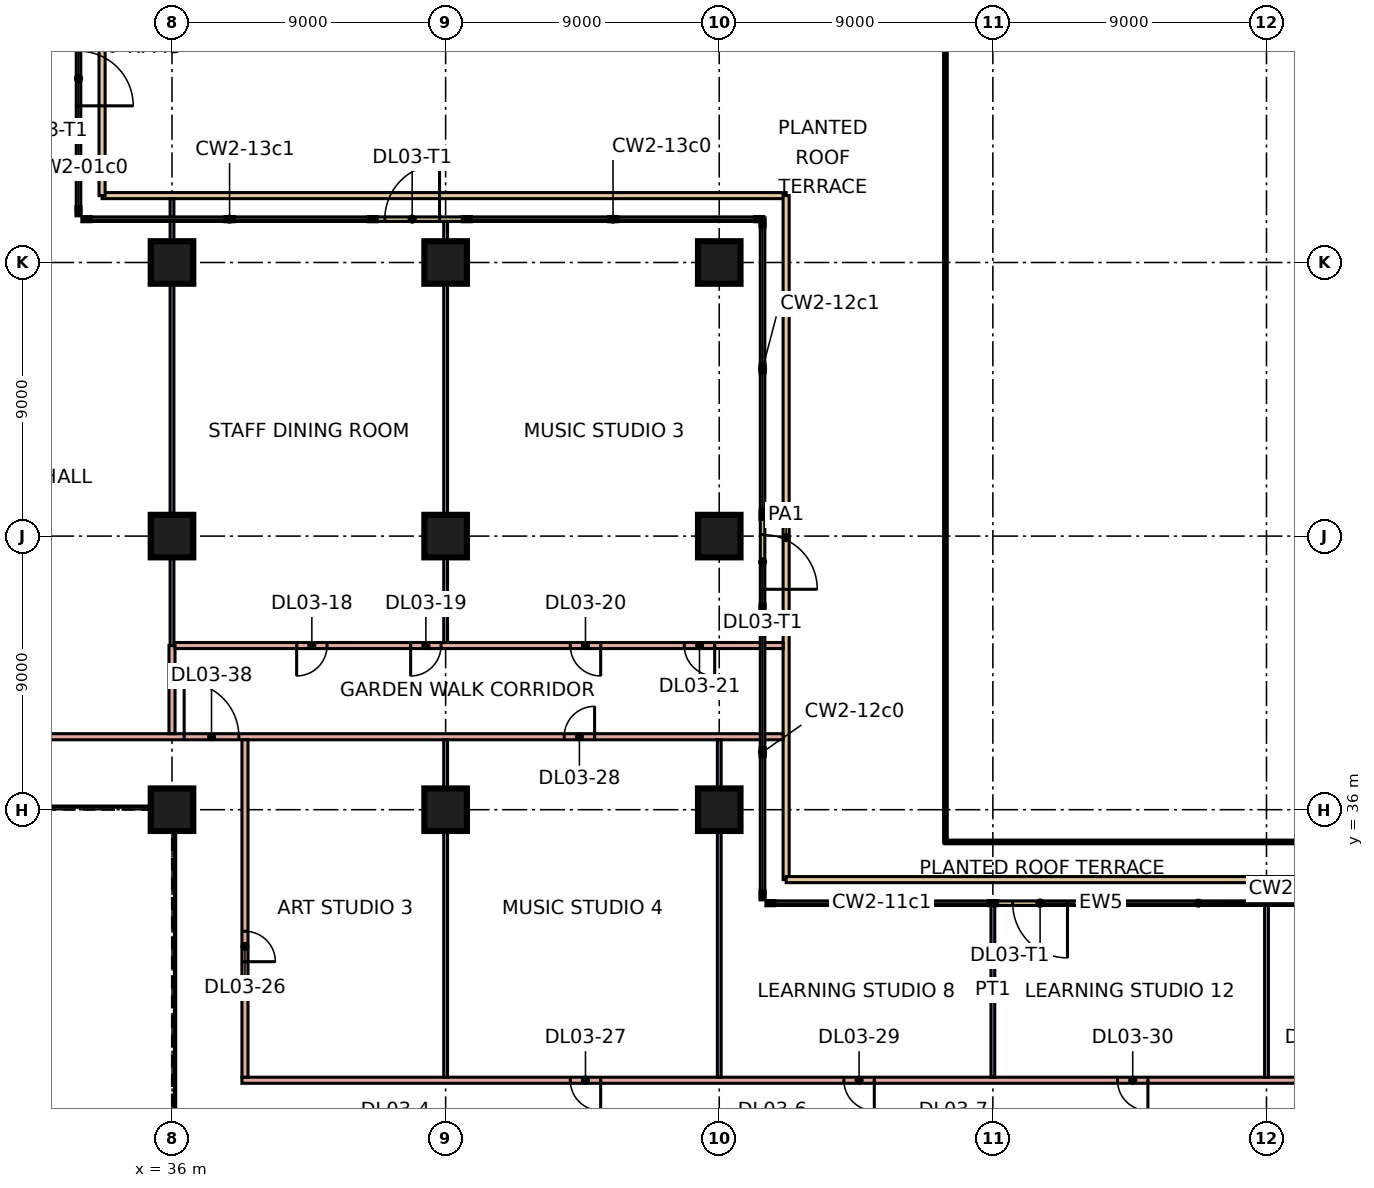
"""IFC4 building model, lengths in metres.
Left out: names, types, materials, properties, quantities, classifications, styles, units other than length and angle.
Written with IfcOpenShell. Run it as: python <this file> out.ifc"""

import sys

from ifc_helpers import new_model, si_unit, direction, frame, frame_2d, origin, origin_2d, place, context, subcontext, project, spatial, rectangle, extrude, element, fill, save


model = new_model("IFC4")
c1 = context("Model", 3, precision=1e-05, world=origin(), true_north=direction((0.0, 1.0)))
c2 = subcontext(c1, "Body", "Model", "MODEL_VIEW")
j1 = project(units=[si_unit("LENGTHUNIT", "METRE"), si_unit("PLANEANGLEUNIT", "RADIAN")], contexts=[c1])
p1 = place(None, origin())
s1 = spatial("IfcSite", under=j1, at=p1, CompositionType="ELEMENT")
p2 = place(p1, origin())
s2 = spatial("IfcBuilding", under=s1, at=p2, CompositionType="ELEMENT")
p3 = place(p2, frame((0.0, 0.0, 16.8)))
s3 = spatial("IfcBuildingStorey", under=s2, at=p3, CompositionType="ELEMENT", Elevation=16.8)
for number, where, z_axis, x_axis in (
    (1, (36.0, 36.0, 0.0), (0.0, 0.0, 1.0), (1.0, 0.0, 0.0)),
    (2, (45.0, 36.0, 0.0), (0.0, 0.0, 1.0), (1.0, 0.0, 0.0)),
    (3, (54.0, 36.0, 0.0), (0.0, 0.0, 1.0), (1.0, 0.0, 0.0)),
    (4, (36.0, 45.0, 0.0), (0.0, 0.0, 1.0), (1.0, 0.0, 0.0)),
    (5, (45.0, 45.0, 0.0), (0.0, 0.0, 1.0), (1.0, 0.0, 0.0)),
    (6, (54.0, 45.0, 0.0), (0.0, 0.0, 1.0), (1.0, 0.0, 0.0)),
    (7, (36.0, 54.0, 0.0), (0.0, 0.0, 1.0), (1.0, 0.0, 0.0)),
    (8, (45.0, 54.0, 0.0), (0.0, 0.0, 1.0), (1.0, 0.0, 0.0)),
    (9, (54.0, 54.0, 0.0), (0.0, 0.0, 1.0), (1.0, 0.0, 0.0)),
):
    element("IfcColumn", number, at=place(p3, frame(where, z_axis=z_axis, x_axis=x_axis)), inside=s3, PredefinedType="COLUMN", context=c2, shape_type="SweptSolid", body=[
        extrude(rectangle(XDim=1.4, YDim=1.4, at=origin_2d()), origin(), (0.0, 0.0, 1.0), 4.8),
    ])
p4 = place(p3, frame((32.925, 58.553, 0.0), z_axis=(0.0, 0.0, 1.0), x_axis=(0.0, 1.0, 0.0)))
e10 = element("IfcWall", 10, at=p4, inside=s3, PredefinedType="SOLIDWALL", context=c2, shape_type="SweptSolid", body=[
    extrude(rectangle(XDim=3.0, YDim=0.15, at=frame_2d((1.5, 0.0))), origin(), (0.0, 0.0, 1.0), 4.4),
])
p5 = place(p4, frame((0.6, 0.0, 0.0)))
e11 = element("IfcOpeningElement", 11, at=p5, cuts=e10, PredefinedType="OPENING", context=c2, shape_type="SweptSolid", body=[
    extrude(rectangle(XDim=1.8, YDim=2.4, at=frame_2d((0.9, 1.2))), frame((0.0, 0.085, 0.0), z_axis=(0.0, -1.0, 0.0), x_axis=(1.0, 0.0, 0.0)), (0.0, 0.0, 1.0), 0.17),
])
p6 = place(p3, frame((66.053, 32.925, 0.0), z_axis=(0.0, 0.0, 1.0), x_axis=(-1.0, 0.0, 0.0)))
e12 = element("IfcWall", 12, at=p6, inside=s3, PredefinedType="SOLIDWALL", context=c2, shape_type="SweptSolid", body=[
    extrude(rectangle(XDim=3.0, YDim=0.15, at=frame_2d((1.5, 0.0))), origin(), (0.0, 0.0, 1.0), 4.4),
])
p7 = place(p6, frame((0.6, 0.0, 0.0)))
e13 = element("IfcOpeningElement", 13, at=p7, cuts=e12, PredefinedType="OPENING", context=c2, shape_type="SweptSolid", body=[
    extrude(rectangle(XDim=1.8, YDim=2.4, at=frame_2d((0.9, 1.2))), frame((0.0, 0.085, 0.0), z_axis=(0.0, -1.0, 0.0), x_axis=(1.0, 0.0, 0.0)), (0.0, 0.0, 1.0), 0.17),
])
p8 = place(p3, frame((55.425, 42.65, 0.0), z_axis=(0.0, 0.0, 1.0), x_axis=(0.0, 1.0, 0.0)))
e14 = element("IfcWall", 14, at=p8, inside=s3, PredefinedType="SOLIDWALL", context=c2, shape_type="SweptSolid", body=[
    extrude(rectangle(XDim=3.0, YDim=0.15, at=frame_2d((1.5, 0.0))), origin(), (0.0, 0.0, 1.0), 4.4),
])
p9 = place(p8, frame((0.6, 0.0, 0.0)))
e15 = element("IfcOpeningElement", 15, at=p9, cuts=e14, PredefinedType="OPENING", context=c2, shape_type="SweptSolid", body=[
    extrude(rectangle(XDim=1.8, YDim=2.4, at=frame_2d((0.9, 1.2))), frame((0.0, 0.085, 0.0), z_axis=(0.0, -1.0, 0.0), x_axis=(1.0, 0.0, 0.0)), (0.0, 0.0, 1.0), 0.17),
])
p10 = place(p3, frame((45.65, 55.425, 0.0), z_axis=(0.0, 0.0, 1.0), x_axis=(-1.0, 0.0, 0.0)))
e16 = element("IfcWall", 16, at=p10, inside=s3, PredefinedType="SOLIDWALL", context=c2, shape_type="SweptSolid", body=[
    extrude(rectangle(XDim=3.0, YDim=0.15, at=frame_2d((1.5, 0.0))), origin(), (0.0, 0.0, 1.0), 4.4),
])
p11 = place(p10, frame((0.85, 0.0, 0.0)))
e17 = element("IfcOpeningElement", 17, at=p11, cuts=e16, PredefinedType="OPENING", context=c2, shape_type="SweptSolid", body=[
    extrude(rectangle(XDim=1.8, YDim=2.4, at=frame_2d((0.9, 1.2))), frame((0.0, 0.085, 0.0), z_axis=(0.0, -1.0, 0.0), x_axis=(1.0, 0.0, 0.0)), (0.0, 0.0, 1.0), 0.17),
])
for number, where, z_axis, x_axis in (
    (18, (33.7, 56.2, 0.0), (0.0, 0.0, 1.0), (1.0, 0.0, 0.0)),
    (19, (56.2, 56.2, 0.0), (0.0, 0.0, 1.0), (0.0, -1.0, 0.0)),
):
    element("IfcWall", number, at=place(p3, frame(where, z_axis=z_axis, x_axis=x_axis)), inside=s3, PredefinedType="PARAPET", context=c2, shape_type="SweptSolid", body=[
        extrude(rectangle(XDim=22.5, YDim=0.2, at=frame_2d((11.25, 0.0))), origin(), (0.0, 0.0, 1.0), 0.5),
    ])
p12 = place(p3, frame((56.2, 33.7, 0.0), z_axis=(0.0, 0.0, 1.0), x_axis=(1.0, 0.0, 0.0)))
e20 = element("IfcWall", 20, at=p12, inside=s3, PredefinedType="PARAPET", context=c2, shape_type="SweptSolid", body=[
    extrude(rectangle(XDim=17.697, YDim=0.2, at=frame_2d((8.848, 0.0))), origin(), (0.0, 0.0, 1.0), 0.5),
])
p13 = place(p3, frame((33.7, 64.896, 0.0), z_axis=(0.0, 0.0, 1.0), x_axis=(0.0, -1.0, 0.0)))
e21 = element("IfcWall", 21, at=p13, inside=s3, PredefinedType="PARAPET", context=c2, shape_type="SweptSolid", body=[
    extrude(rectangle(XDim=8.697, YDim=0.2, at=frame_2d((4.348, 0.0))), origin(), (0.0, 0.0, 1.0), 0.5),
])
p14 = place(p3, frame((27.0, 38.4, 0.0), z_axis=(0.0, 0.0, 1.0), x_axis=(1.0, 0.0, 0.0)))
e22 = element("IfcWall", 22, at=p14, inside=s3, PredefinedType="PARTITIONING", context=c2, shape_type="SweptSolid", body=[
    extrude(rectangle(XDim=29.1, YDim=0.2, at=frame_2d((14.55, 0.0))), origin(), (0.0, 0.0, 1.0), 4.4),
])
p15 = place(p14, frame((21.9, 0.0, 0.0)))
e23 = element("IfcOpeningElement", 23, at=p15, cuts=e22, PredefinedType="OPENING", context=c2, shape_type="SweptSolid", body=[
    extrude(rectangle(XDim=1.0, YDim=2.1, at=frame_2d((0.5, 1.05))), frame((0.0, 0.11, 0.0), z_axis=(0.0, -1.0, 0.0), x_axis=(1.0, 0.0, 0.0)), (0.0, 0.0, 1.0), 0.22),
])
p16 = place(p14, frame((9.4, 0.0, 0.0)))
e24 = element("IfcOpeningElement", 24, at=p16, cuts=e22, PredefinedType="OPENING", context=c2, shape_type="SweptSolid", body=[
    extrude(rectangle(XDim=1.8, YDim=2.1, at=frame_2d((0.9, 1.05))), frame((0.0, 0.11, 0.0), z_axis=(0.0, -1.0, 0.0), x_axis=(1.0, 0.0, 0.0)), (0.0, 0.0, 1.0), 0.22),
])
p17 = place(p3, frame((36.0, 38.5, 0.0), z_axis=(0.0, 0.0, 1.0), x_axis=(0.0, 1.0, 0.0)))
e25 = element("IfcWall", 25, at=p17, inside=s3, PredefinedType="PARTITIONING", context=c2, shape_type="SweptSolid", body=[
    extrude(rectangle(XDim=2.9, YDim=0.2, at=frame_2d((1.45, 0.0))), origin(), (0.0, 0.0, 1.0), 4.4),
])
p18 = place(p3, frame((36.0, 41.4, 0.0), z_axis=(0.0, 0.0, 1.0), x_axis=(0.0, 1.0, 0.0)))
e26 = element("IfcWall", 26, at=p18, inside=s3, PredefinedType="PARTITIONING", context=c2, shape_type="SweptSolid", body=[
    extrude(rectangle(XDim=14.7, YDim=0.125, at=frame_2d((7.35, 0.0))), origin(), (0.0, 0.0, 1.0), 4.4),
])
p19 = place(p3, frame((36.1, 41.4, 0.0), z_axis=(0.0, 0.0, 1.0), x_axis=(1.0, 0.0, 0.0)))
e27 = element("IfcWall", 27, at=p19, inside=s3, PredefinedType="PARTITIONING", context=c2, shape_type="SweptSolid", body=[
    extrude(rectangle(XDim=20.0, YDim=0.2, at=frame_2d((10.0, 0.0))), origin(), (0.0, 0.0, 1.0), 4.4),
])
p20 = place(p19, frame((4.0, 0.0, 0.0)))
e28 = element("IfcOpeningElement", 28, at=p20, cuts=e27, PredefinedType="OPENING", context=c2, shape_type="SweptSolid", body=[
    extrude(rectangle(XDim=1.0, YDim=2.1, at=frame_2d((0.5, 1.05))), frame((0.0, 0.11, 0.0), z_axis=(0.0, -1.0, 0.0), x_axis=(1.0, 0.0, 0.0)), (0.0, 0.0, 1.0), 0.22),
])
p21 = place(p19, frame((7.75, 0.0, 0.0)))
e29 = element("IfcOpeningElement", 29, at=p21, cuts=e27, PredefinedType="OPENING", context=c2, shape_type="SweptSolid", body=[
    extrude(rectangle(XDim=1.0, YDim=2.1, at=frame_2d((0.5, 1.05))), frame((0.0, 0.11, 0.0), z_axis=(0.0, -1.0, 0.0), x_axis=(1.0, 0.0, 0.0)), (0.0, 0.0, 1.0), 0.22),
])
p22 = place(p19, frame((13.0, 0.0, 0.0)))
e30 = element("IfcOpeningElement", 30, at=p22, cuts=e27, PredefinedType="OPENING", context=c2, shape_type="SweptSolid", body=[
    extrude(rectangle(XDim=1.0, YDim=2.1, at=frame_2d((0.5, 1.05))), frame((0.0, 0.11, 0.0), z_axis=(0.0, -1.0, 0.0), x_axis=(1.0, 0.0, 0.0)), (0.0, 0.0, 1.0), 0.22),
])
p23 = place(p19, frame((16.75, 0.0, 0.0)))
e31 = element("IfcOpeningElement", 31, at=p23, cuts=e27, PredefinedType="OPENING", context=c2, shape_type="SweptSolid", body=[
    extrude(rectangle(XDim=1.0, YDim=2.1, at=frame_2d((0.5, 1.05))), frame((0.0, 0.11, 0.0), z_axis=(0.0, -1.0, 0.0), x_axis=(1.0, 0.0, 0.0)), (0.0, 0.0, 1.0), 0.22),
])
p24 = place(p3, frame((38.3, 27.1, 0.0), z_axis=(0.0, 0.0, 1.0), x_axis=(1.0, 0.0, 0.0)))
e32 = element("IfcWall", 32, at=p24, inside=s3, PredefinedType="PARTITIONING", context=c2, shape_type="SweptSolid", body=[
    extrude(rectangle(XDim=36.8, YDim=0.2, at=frame_2d((18.4, 0.0))), origin(), (0.0, 0.0, 1.0), 4.4),
])
p25 = place(p24, frame((10.8, 0.0, 0.0)))
e33 = element("IfcOpeningElement", 33, at=p25, cuts=e32, PredefinedType="OPENING", context=c2, shape_type="SweptSolid", body=[
    extrude(rectangle(XDim=1.0, YDim=2.1, at=frame_2d((0.5, 1.05))), frame((0.0, 0.11, 0.0), z_axis=(0.0, -1.0, 0.0), x_axis=(1.0, 0.0, 0.0)), (0.0, 0.0, 1.0), 0.22),
])
p26 = place(p24, frame((19.8, 0.0, 0.0)))
e34 = element("IfcOpeningElement", 34, at=p26, cuts=e32, PredefinedType="OPENING", context=c2, shape_type="SweptSolid", body=[
    extrude(rectangle(XDim=1.0, YDim=2.1, at=frame_2d((0.5, 1.05))), frame((0.0, 0.11, 0.0), z_axis=(0.0, -1.0, 0.0), x_axis=(1.0, 0.0, 0.0)), (0.0, 0.0, 1.0), 0.22),
])
p27 = place(p24, frame((28.8, 0.0, 0.0)))
e35 = element("IfcOpeningElement", 35, at=p27, cuts=e32, PredefinedType="OPENING", context=c2, shape_type="SweptSolid", body=[
    extrude(rectangle(XDim=1.0, YDim=2.1, at=frame_2d((0.5, 1.05))), frame((0.0, 0.11, 0.0), z_axis=(0.0, -1.0, 0.0), x_axis=(1.0, 0.0, 0.0)), (0.0, 0.0, 1.0), 0.22),
])
p28 = place(p24, frame((35.15, 0.0, 0.0)))
e36 = element("IfcOpeningElement", 36, at=p28, cuts=e32, PredefinedType="OPENING", context=c2, shape_type="SweptSolid", body=[
    extrude(rectangle(XDim=1.0, YDim=2.1, at=frame_2d((0.5, 1.05))), frame((0.0, 0.11, 0.0), z_axis=(0.0, -1.0, 0.0), x_axis=(1.0, 0.0, 0.0)), (0.0, 0.0, 1.0), 0.22),
])
p29 = place(p3, frame((38.4, 27.2, 0.0), z_axis=(0.0, 0.0, 1.0), x_axis=(0.0, 1.0, 0.0)))
e37 = element("IfcWall", 37, at=p29, inside=s3, PredefinedType="PARTITIONING", context=c2, shape_type="SweptSolid", body=[
    extrude(rectangle(XDim=11.1, YDim=0.2, at=frame_2d((5.55, 0.0))), origin(), (0.0, 0.0, 1.0), 4.4),
])
p30 = place(p29, frame((3.8, 0.0, 0.0)))
e38 = element("IfcOpeningElement", 38, at=p30, cuts=e37, PredefinedType="OPENING", context=c2, shape_type="SweptSolid", body=[
    extrude(rectangle(XDim=1.0, YDim=2.1, at=frame_2d((0.5, 1.05))), frame((0.0, 0.11, 0.0), z_axis=(0.0, -1.0, 0.0), x_axis=(1.0, 0.0, 0.0)), (0.0, 0.0, 1.0), 0.22),
])
p31 = place(p3, frame((45.0, 27.2, 0.0), z_axis=(0.0, 0.0, 1.0), x_axis=(0.0, 1.0, 0.0)))
e39 = element("IfcWall", 39, at=p31, inside=s3, PredefinedType="PARTITIONING", context=c2, shape_type="SweptSolid", body=[
    extrude(rectangle(XDim=11.1, YDim=0.125, at=frame_2d((5.55, 0.0))), origin(), (0.0, 0.0, 1.0), 4.4),
])
p32 = place(p3, frame((45.0, 41.5, 0.0), z_axis=(0.0, 0.0, 1.0), x_axis=(0.0, 1.0, 0.0)))
e40 = element("IfcWall", 40, at=p32, inside=s3, PredefinedType="PARTITIONING", context=c2, shape_type="SweptSolid", body=[
    extrude(rectangle(XDim=13.851, YDim=0.125, at=frame_2d((6.926, 0.0))), origin(), (0.0, 0.0, 1.0), 4.4),
])
p33 = place(p3, frame((54.0, 27.2, 0.0), z_axis=(0.0, 0.0, 1.0), x_axis=(0.0, 1.0, 0.0)))
e41 = element("IfcWall", 41, at=p33, inside=s3, PredefinedType="PARTITIONING", context=c2, shape_type="SweptSolid", body=[
    extrude(rectangle(XDim=11.1, YDim=0.125, at=frame_2d((5.55, 0.0))), origin(), (0.0, 0.0, 1.0), 4.4),
])
p34 = place(p3, frame((63.0, 27.2, 0.0), z_axis=(0.0, 0.0, 1.0), x_axis=(0.0, 1.0, 0.0)))
e42 = element("IfcWall", 42, at=p34, inside=s3, PredefinedType="PARTITIONING", context=c2, shape_type="SweptSolid", body=[
    extrude(rectangle(XDim=5.725, YDim=0.125, at=frame_2d((2.863, 0.0))), origin(), (0.0, 0.0, 1.0), 4.4),
])
p35 = place(p3, frame((72.0, 27.2, 0.0), z_axis=(0.0, 0.0, 1.0), x_axis=(0.0, 1.0, 0.0)))
e43 = element("IfcWall", 43, at=p35, inside=s3, PredefinedType="PARTITIONING", context=c2, shape_type="SweptSolid", body=[
    extrude(rectangle(XDim=6.4, YDim=0.125, at=frame_2d((3.2, 0.0))), origin(), (0.0, 0.0, 1.0), 4.4),
])
p36 = place(p5, frame((1.8, 0.0, 0.0), z_axis=(0.0, 0.0, 1.0), x_axis=(-1.0, 0.0, 0.0)))
e44 = element("IfcDoor", 44, at=p36, inside=s3, OperationType="DOUBLE_DOOR_SINGLE_SWING", PredefinedType="DOOR", context=c2, shape_type="SweptSolid", body=[
    extrude(rectangle(XDim=1.8, YDim=2.4, at=frame_2d((0.9, 1.2))), frame((0.0, 0.025, 0.0), z_axis=(0.0, -1.0, 0.0), x_axis=(1.0, 0.0, 0.0)), (0.0, 0.0, 1.0), 0.05),
])
fill(e11, e44)
p37 = place(p7, origin())
e45 = element("IfcDoor", 45, at=p37, inside=s3, OperationType="DOUBLE_DOOR_SINGLE_SWING", PredefinedType="DOOR", context=c2, shape_type="SweptSolid", body=[
    extrude(rectangle(XDim=1.8, YDim=2.4, at=frame_2d((0.9, 1.2))), frame((0.0, 0.025, 0.0), z_axis=(0.0, -1.0, 0.0), x_axis=(1.0, 0.0, 0.0)), (0.0, 0.0, 1.0), 0.05),
])
fill(e13, e45)
p38 = place(p9, frame((1.8, 0.0, 0.0), z_axis=(0.0, 0.0, 1.0), x_axis=(-1.0, 0.0, 0.0)))
e46 = element("IfcDoor", 46, at=p38, inside=s3, OperationType="DOUBLE_DOOR_SINGLE_SWING", PredefinedType="DOOR", context=c2, shape_type="SweptSolid", body=[
    extrude(rectangle(XDim=1.8, YDim=2.4, at=frame_2d((0.9, 1.2))), frame((0.0, 0.025, 0.0), z_axis=(0.0, -1.0, 0.0), x_axis=(1.0, 0.0, 0.0)), (0.0, 0.0, 1.0), 0.05),
])
fill(e15, e46)
p39 = place(p11, frame((1.8, 0.0, 0.0), z_axis=(0.0, 0.0, 1.0), x_axis=(-1.0, 0.0, 0.0)))
e47 = element("IfcDoor", 47, at=p39, inside=s3, OperationType="DOUBLE_DOOR_SINGLE_SWING", PredefinedType="DOOR", context=c2, shape_type="SweptSolid", body=[
    extrude(rectangle(XDim=1.8, YDim=2.4, at=frame_2d((0.9, 1.2))), frame((0.0, 0.025, 0.0), z_axis=(0.0, -1.0, 0.0), x_axis=(1.0, 0.0, 0.0)), (0.0, 0.0, 1.0), 0.05),
])
fill(e17, e47)
p40 = place(p20, frame((1.0, 0.0, 0.0), z_axis=(0.0, 0.0, 1.0), x_axis=(-1.0, 0.0, 0.0)))
e48 = element("IfcDoor", 48, at=p40, inside=s3, OperationType="SINGLE_SWING_LEFT", PredefinedType="DOOR", context=c2, shape_type="SweptSolid", body=[
    extrude(rectangle(XDim=1.0, YDim=2.1, at=frame_2d((0.5, 1.05))), frame((0.0, 0.025, 0.0), z_axis=(0.0, -1.0, 0.0), x_axis=(1.0, 0.0, 0.0)), (0.0, 0.0, 1.0), 0.05),
])
fill(e28, e48)
p41 = place(p21, frame((1.0, 0.0, 0.0), z_axis=(0.0, 0.0, 1.0), x_axis=(-1.0, 0.0, 0.0)))
e49 = element("IfcDoor", 49, at=p41, inside=s3, OperationType="SINGLE_SWING_LEFT", PredefinedType="DOOR", context=c2, shape_type="SweptSolid", body=[
    extrude(rectangle(XDim=1.0, YDim=2.1, at=frame_2d((0.5, 1.05))), frame((0.0, 0.025, 0.0), z_axis=(0.0, -1.0, 0.0), x_axis=(1.0, 0.0, 0.0)), (0.0, 0.0, 1.0), 0.05),
])
fill(e29, e49)
p42 = place(p22, origin())
e50 = element("IfcDoor", 50, at=p42, inside=s3, OperationType="SINGLE_SWING_RIGHT", PredefinedType="DOOR", context=c2, shape_type="SweptSolid", body=[
    extrude(rectangle(XDim=1.0, YDim=2.1, at=frame_2d((0.5, 1.05))), frame((0.0, 0.025, 0.0), z_axis=(0.0, -1.0, 0.0), x_axis=(1.0, 0.0, 0.0)), (0.0, 0.0, 1.0), 0.05),
])
fill(e30, e50)
p43 = place(p23, origin())
e51 = element("IfcDoor", 51, at=p43, inside=s3, OperationType="SINGLE_SWING_RIGHT", PredefinedType="DOOR", context=c2, shape_type="SweptSolid", body=[
    extrude(rectangle(XDim=1.0, YDim=2.1, at=frame_2d((0.5, 1.05))), frame((0.0, 0.025, 0.0), z_axis=(0.0, -1.0, 0.0), x_axis=(1.0, 0.0, 0.0)), (0.0, 0.0, 1.0), 0.05),
])
fill(e31, e51)
p44 = place(p30, frame((1.0, 0.0, 0.0), z_axis=(0.0, 0.0, 1.0), x_axis=(-1.0, 0.0, 0.0)))
e52 = element("IfcDoor", 52, at=p44, inside=s3, OperationType="SINGLE_SWING_LEFT", PredefinedType="DOOR", context=c2, shape_type="SweptSolid", body=[
    extrude(rectangle(XDim=1.0, YDim=2.1, at=frame_2d((0.5, 1.05))), frame((0.0, 0.025, 0.0), z_axis=(0.0, -1.0, 0.0), x_axis=(1.0, 0.0, 0.0)), (0.0, 0.0, 1.0), 0.05),
])
fill(e38, e52)
p45 = place(p25, origin())
e53 = element("IfcDoor", 53, at=p45, inside=s3, OperationType="SINGLE_SWING_RIGHT", PredefinedType="DOOR", context=c2, shape_type="SweptSolid", body=[
    extrude(rectangle(XDim=1.0, YDim=2.1, at=frame_2d((0.5, 1.05))), frame((0.0, 0.025, 0.0), z_axis=(0.0, -1.0, 0.0), x_axis=(1.0, 0.0, 0.0)), (0.0, 0.0, 1.0), 0.05),
])
fill(e33, e53)
p46 = place(p15, frame((1.0, 0.0, 0.0), z_axis=(0.0, 0.0, 1.0), x_axis=(-1.0, 0.0, 0.0)))
e54 = element("IfcDoor", 54, at=p46, inside=s3, OperationType="SINGLE_SWING_RIGHT", PredefinedType="DOOR", context=c2, shape_type="SweptSolid", body=[
    extrude(rectangle(XDim=1.0, YDim=2.1, at=frame_2d((0.5, 1.05))), frame((0.0, 0.025, 0.0), z_axis=(0.0, -1.0, 0.0), x_axis=(1.0, 0.0, 0.0)), (0.0, 0.0, 1.0), 0.05),
])
fill(e23, e54)
p47 = place(p26, origin())
e55 = element("IfcDoor", 55, at=p47, inside=s3, OperationType="SINGLE_SWING_RIGHT", PredefinedType="DOOR", context=c2, shape_type="SweptSolid", body=[
    extrude(rectangle(XDim=1.0, YDim=2.1, at=frame_2d((0.5, 1.05))), frame((0.0, 0.025, 0.0), z_axis=(0.0, -1.0, 0.0), x_axis=(1.0, 0.0, 0.0)), (0.0, 0.0, 1.0), 0.05),
])
fill(e34, e55)
p48 = place(p27, origin())
e56 = element("IfcDoor", 56, at=p48, inside=s3, OperationType="SINGLE_SWING_RIGHT", PredefinedType="DOOR", context=c2, shape_type="SweptSolid", body=[
    extrude(rectangle(XDim=1.0, YDim=2.1, at=frame_2d((0.5, 1.05))), frame((0.0, 0.025, 0.0), z_axis=(0.0, -1.0, 0.0), x_axis=(1.0, 0.0, 0.0)), (0.0, 0.0, 1.0), 0.05),
])
fill(e35, e56)
p49 = place(p16, origin())
e57 = element("IfcDoor", 57, at=p49, inside=s3, OperationType="DOUBLE_DOOR_SINGLE_SWING", PredefinedType="DOOR", context=c2, shape_type="SweptSolid", body=[
    extrude(rectangle(XDim=1.8, YDim=2.1, at=frame_2d((0.9, 1.05))), frame((0.0, 0.025, 0.0), z_axis=(0.0, -1.0, 0.0), x_axis=(1.0, 0.0, 0.0)), (0.0, 0.0, 1.0), 0.05),
])
fill(e24, e57)
save(model, sys.argv[1])
